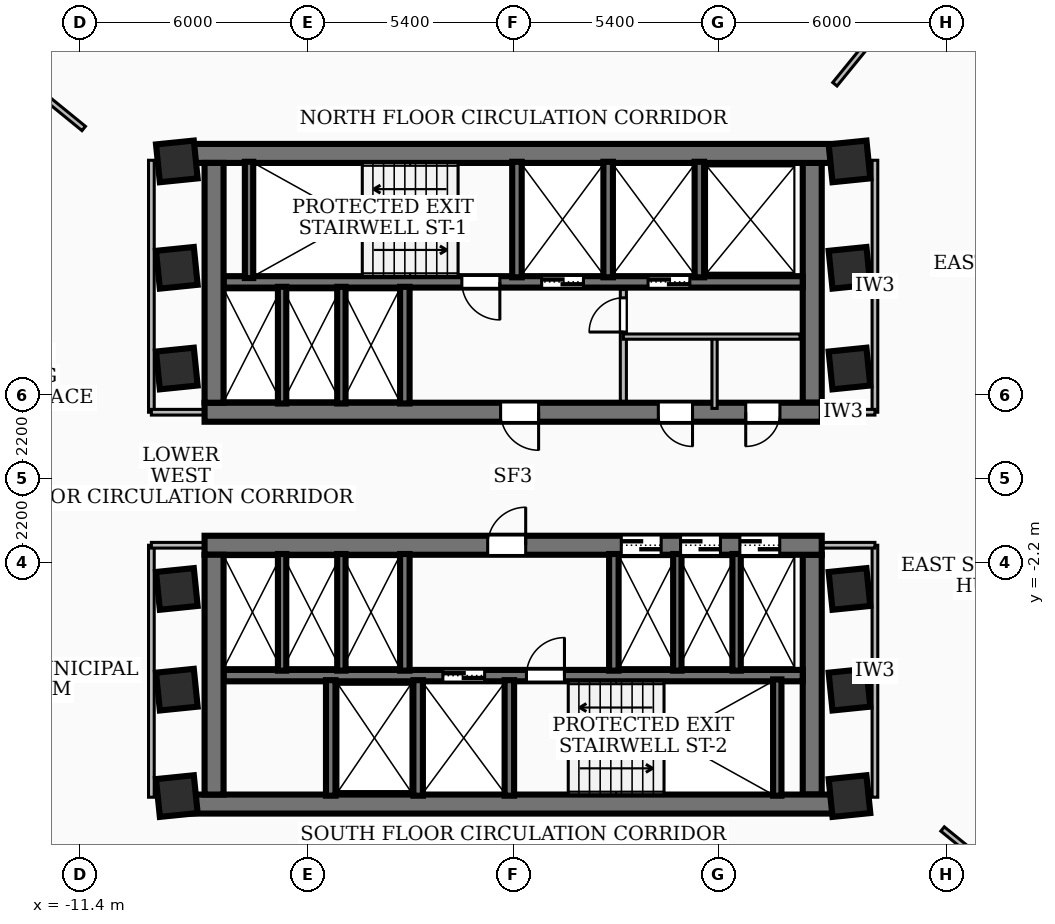
"""IFC4 building model, lengths in metres.
Left out: names, types, materials, properties, quantities, classifications, styles, units other than length and angle.
Written with IfcOpenShell. Run it as: python <this file> out.ifc"""

import sys

from ifc_helpers import new_model, si_unit, direction, frame, frame_2d, origin, origin_2d, place, context, subcontext, project, spatial, rectangle, extrude, element, fill, save


model = new_model("IFC4")
c1 = context("Model", 3, precision=1e-05, world=origin(), true_north=direction((0.0, 1.0)))
c2 = subcontext(c1, "Body", "Model", "MODEL_VIEW")
j1 = project(units=[si_unit("LENGTHUNIT", "METRE"), si_unit("PLANEANGLEUNIT", "RADIAN")], contexts=[c1])
p1 = place(None, origin())
s1 = spatial("IfcSite", under=j1, at=p1, CompositionType="ELEMENT")
p2 = place(p1, origin())
s2 = spatial("IfcBuilding", under=s1, at=p2, CompositionType="ELEMENT")
p3 = place(p2, frame((0.0, 0.0, 71.28)))
s3 = spatial("IfcBuildingStorey", under=s2, at=p3, CompositionType="ELEMENT", Elevation=71.28)
p4 = place(p3, frame((-8.78, 8.56, 0.0), z_axis=(0.0, 0.0, 1.0), x_axis=(1.0, 0.0, 0.0)))
e1 = element("IfcWall", 1, at=p4, inside=s3, PredefinedType="SHEAR", context=c2, shape_type="SweptSolid", body=[
    extrude(rectangle(XDim=17.56, YDim=0.5, at=frame_2d((8.78, 0.0))), origin(), (0.0, 0.0, 1.0), 3.34),
])
p5 = place(p3, frame((8.12, 1.75, 0.0), z_axis=(0.0, 0.0, 1.0), x_axis=(-1.0, 0.0, 0.0)))
e2 = element("IfcWall", 2, at=p5, inside=s3, PredefinedType="SHEAR", context=c2, shape_type="SweptSolid", body=[
    extrude(rectangle(XDim=16.24, YDim=0.5, at=frame_2d((8.12, 0.0))), origin(), (0.0, 0.0, 1.0), 3.34),
])
p6 = place(p5, frame((7.45, 0.0, 0.0)))
e3 = element("IfcOpeningElement", 3, at=p6, cuts=e2, PredefinedType="OPENING", context=c2, shape_type="SweptSolid", body=[
    extrude(rectangle(XDim=1.0, YDim=2.1, at=frame_2d((0.5, 1.05))), frame((0.0, 0.26, 0.0), z_axis=(0.0, -1.0, 0.0), x_axis=(1.0, 0.0, 0.0)), (0.0, 0.0, 1.0), 0.52),
])
p7 = place(p5, frame((3.4, 0.0, 0.0)))
e4 = element("IfcOpeningElement", 4, at=p7, cuts=e2, PredefinedType="OPENING", context=c2, shape_type="SweptSolid", body=[
    extrude(rectangle(XDim=0.9, YDim=2.06, at=frame_2d((0.45, 1.03))), frame((0.0, 0.26, 0.0), z_axis=(0.0, -1.0, 0.0), x_axis=(1.0, 0.0, 0.0)), (0.0, 0.0, 1.0), 0.52),
])
p8 = place(p5, frame((1.1, 0.0, 0.0)))
e5 = element("IfcOpeningElement", 5, at=p8, cuts=e2, PredefinedType="OPENING", context=c2, shape_type="SweptSolid", body=[
    extrude(rectangle(XDim=0.9, YDim=2.06, at=frame_2d((0.45, 1.03))), frame((0.0, 0.26, 0.0), z_axis=(0.0, -1.0, 0.0), x_axis=(1.0, 0.0, 0.0)), (0.0, 0.0, 1.0), 0.52),
])
for number, where, z_axis, x_axis in (
    (6, (-7.87, 2.0, 0.0), (0.0, 0.0, 1.0), (0.0, 1.0, 0.0)),
    (7, (7.87, 8.31, 0.0), (0.0, 0.0, 1.0), (0.0, -1.0, 0.0)),
):
    element("IfcWall", number, at=place(p3, frame(where, z_axis=z_axis, x_axis=x_axis)), inside=s3, PredefinedType="SHEAR", context=c2, shape_type="SweptSolid", body=[
        extrude(rectangle(XDim=6.31, YDim=0.5, at=frame_2d((3.155, 0.0))), origin(), (0.0, 0.0, 1.0), 3.34),
    ])
p9 = place(p3, frame((7.62, 5.18, 0.0), z_axis=(0.0, 0.0, 1.0), x_axis=(-1.0, 0.0, 0.0)))
e8 = element("IfcWall", 8, at=p9, inside=s3, PredefinedType="SOLIDWALL", context=c2, shape_type="SweptSolid", body=[
    extrude(rectangle(XDim=15.24, YDim=0.3, at=frame_2d((7.62, 0.0))), origin(), (0.0, 0.0, 1.0), 3.34),
])
p10 = place(p9, frame((5.77, 0.0, 0.0)))
e9 = element("IfcOpeningElement", 9, at=p10, cuts=e8, PredefinedType="OPENING", context=c2, shape_type="SweptSolid", body=[
    extrude(rectangle(XDim=1.1, YDim=2.15, at=frame_2d((0.55, 1.075))), frame((0.0, 0.16, 0.0), z_axis=(0.0, -1.0, 0.0), x_axis=(1.0, 0.0, 0.0)), (0.0, 0.0, 1.0), 0.32),
])
p11 = place(p9, frame((2.97, 0.0, 0.0)))
e10 = element("IfcOpeningElement", 10, at=p11, cuts=e8, PredefinedType="OPENING", context=c2, shape_type="SweptSolid", body=[
    extrude(rectangle(XDim=1.1, YDim=2.15, at=frame_2d((0.55, 1.075))), frame((0.0, 0.16, 0.0), z_axis=(0.0, -1.0, 0.0), x_axis=(1.0, 0.0, 0.0)), (0.0, 0.0, 1.0), 0.32),
])
p12 = place(p9, frame((7.97, 0.0, 0.0)))
e11 = element("IfcOpeningElement", 11, at=p12, cuts=e8, PredefinedType="OPENING", context=c2, shape_type="SweptSolid", body=[
    extrude(rectangle(XDim=1.0, YDim=2.1, at=frame_2d((0.5, 1.05))), frame((0.0, 0.16, 0.0), z_axis=(0.0, -1.0, 0.0), x_axis=(1.0, 0.0, 0.0)), (0.0, 0.0, 1.0), 0.32),
])
p13 = place(p3, frame((8.78, -8.56, 0.0), z_axis=(0.0, 0.0, 1.0), x_axis=(-1.0, 0.0, 0.0)))
e12 = element("IfcWall", 12, at=p13, inside=s3, PredefinedType="SHEAR", context=c2, shape_type="SweptSolid", body=[
    extrude(rectangle(XDim=17.56, YDim=0.5, at=frame_2d((8.78, 0.0))), origin(), (0.0, 0.0, 1.0), 3.34),
])
p14 = place(p3, frame((-8.12, -1.75, 0.0), z_axis=(0.0, 0.0, 1.0), x_axis=(1.0, 0.0, 0.0)))
e13 = element("IfcWall", 13, at=p14, inside=s3, PredefinedType="SHEAR", context=c2, shape_type="SweptSolid", body=[
    extrude(rectangle(XDim=16.24, YDim=0.5, at=frame_2d((8.12, 0.0))), origin(), (0.0, 0.0, 1.0), 3.34),
])
p15 = place(p14, frame((7.45, 0.0, 0.0)))
e14 = element("IfcOpeningElement", 14, at=p15, cuts=e13, PredefinedType="OPENING", context=c2, shape_type="SweptSolid", body=[
    extrude(rectangle(XDim=1.0, YDim=2.1, at=frame_2d((0.5, 1.05))), frame((0.0, 0.26, 0.0), z_axis=(0.0, -1.0, 0.0), x_axis=(1.0, 0.0, 0.0)), (0.0, 0.0, 1.0), 0.52),
])
p16 = place(p14, frame((10.965, 0.0, 0.0)))
e15 = element("IfcOpeningElement", 15, at=p16, cuts=e13, PredefinedType="OPENING", context=c2, shape_type="SweptSolid", body=[
    extrude(rectangle(XDim=1.05, YDim=2.15, at=frame_2d((0.525, 1.075))), frame((0.0, 0.26, 0.0), z_axis=(0.0, -1.0, 0.0), x_axis=(1.0, 0.0, 0.0)), (0.0, 0.0, 1.0), 0.52),
])
p17 = place(p14, frame((12.525, 0.0, 0.0)))
e16 = element("IfcOpeningElement", 16, at=p17, cuts=e13, PredefinedType="OPENING", context=c2, shape_type="SweptSolid", body=[
    extrude(rectangle(XDim=1.05, YDim=2.15, at=frame_2d((0.525, 1.075))), frame((0.0, 0.26, 0.0), z_axis=(0.0, -1.0, 0.0), x_axis=(1.0, 0.0, 0.0)), (0.0, 0.0, 1.0), 0.52),
])
p18 = place(p14, frame((14.085, 0.0, 0.0)))
e17 = element("IfcOpeningElement", 17, at=p18, cuts=e13, PredefinedType="OPENING", context=c2, shape_type="SweptSolid", body=[
    extrude(rectangle(XDim=1.05, YDim=2.15, at=frame_2d((0.525, 1.075))), frame((0.0, 0.26, 0.0), z_axis=(0.0, -1.0, 0.0), x_axis=(1.0, 0.0, 0.0)), (0.0, 0.0, 1.0), 0.52),
])
for number, where, z_axis, x_axis in (
    (18, (-7.87, -8.31, 0.0), (0.0, 0.0, 1.0), (0.0, 1.0, 0.0)),
    (19, (7.87, -2.0, 0.0), (0.0, 0.0, 1.0), (0.0, -1.0, 0.0)),
):
    element("IfcWall", number, at=place(p3, frame(where, z_axis=z_axis, x_axis=x_axis)), inside=s3, PredefinedType="SHEAR", context=c2, shape_type="SweptSolid", body=[
        extrude(rectangle(XDim=6.31, YDim=0.5, at=frame_2d((3.155, 0.0))), origin(), (0.0, 0.0, 1.0), 3.34),
    ])
p19 = place(p3, frame((-7.62, -5.18, 0.0), z_axis=(0.0, 0.0, 1.0), x_axis=(1.0, 0.0, 0.0)))
e20 = element("IfcWall", 20, at=p19, inside=s3, PredefinedType="SOLIDWALL", context=c2, shape_type="SweptSolid", body=[
    extrude(rectangle(XDim=15.24, YDim=0.3, at=frame_2d((7.62, 0.0))), origin(), (0.0, 0.0, 1.0), 3.34),
])
p20 = place(p19, frame((5.77, 0.0, 0.0)))
e21 = element("IfcOpeningElement", 21, at=p20, cuts=e20, PredefinedType="OPENING", context=c2, shape_type="SweptSolid", body=[
    extrude(rectangle(XDim=1.1, YDim=2.15, at=frame_2d((0.55, 1.075))), frame((0.0, 0.16, 0.0), z_axis=(0.0, -1.0, 0.0), x_axis=(1.0, 0.0, 0.0)), (0.0, 0.0, 1.0), 0.32),
])
p21 = place(p19, frame((7.97, 0.0, 0.0)))
e22 = element("IfcOpeningElement", 22, at=p21, cuts=e20, PredefinedType="OPENING", context=c2, shape_type="SweptSolid", body=[
    extrude(rectangle(XDim=1.0, YDim=2.1, at=frame_2d((0.5, 1.05))), frame((0.0, 0.16, 0.0), z_axis=(0.0, -1.0, 0.0), x_axis=(1.0, 0.0, 0.0)), (0.0, 0.0, 1.0), 0.32),
])
for number, where, z_axis, x_axis in (
    (23, (-6.95, 5.28, 0.0), (0.0, 0.0, 1.0), (0.0, 1.0, 0.0)),
    (24, (6.95, -8.34, 0.0), (0.0, 0.0, 1.0), (0.0, 1.0, 0.0)),
):
    element("IfcWall", number, at=place(p3, frame(where, z_axis=z_axis, x_axis=x_axis)), inside=s3, PredefinedType="SOLIDWALL", context=c2, shape_type="SweptSolid", body=[
        extrude(rectangle(XDim=3.06, YDim=0.22, at=frame_2d((1.53, 0.0))), origin(), (0.0, 0.0, 1.0), 3.34),
    ])
for number, where, z_axis, x_axis in (
    (25, (0.1, 5.3, 0.0), (0.0, 0.0, 1.0), (0.0, 1.0, 0.0)),
    (26, (2.5, 5.3, 0.0), (0.0, 0.0, 1.0), (0.0, 1.0, 0.0)),
    (27, (4.9, 5.3, 0.0), (0.0, 0.0, 1.0), (0.0, 1.0, 0.0)),
):
    element("IfcWall", number, at=place(p3, frame(where, z_axis=z_axis, x_axis=x_axis)), inside=s3, PredefinedType="SOLIDWALL", context=c2, shape_type="SweptSolid", body=[
        extrude(rectangle(XDim=3.04, YDim=0.25, at=frame_2d((1.52, 0.0))), origin(), (0.0, 0.0, 1.0), 3.34),
    ])
p22 = place(p3, frame((-2.85, 1.98, 0.0), z_axis=(0.0, 0.0, 1.0), x_axis=(0.0, 1.0, 0.0)))
e28 = element("IfcWall", 28, at=p22, inside=s3, PredefinedType="SOLIDWALL", context=c2, shape_type="SweptSolid", body=[
    extrude(rectangle(XDim=3.07, YDim=0.25, at=frame_2d((1.535, 0.0))), origin(), (0.0, 0.0, 1.0), 3.34),
])
for number, where, z_axis, x_axis in (
    (29, (-0.1, -8.34, 0.0), (0.0, 0.0, 1.0), (0.0, 1.0, 0.0)),
    (30, (-2.5, -8.34, 0.0), (0.0, 0.0, 1.0), (0.0, 1.0, 0.0)),
    (31, (-4.8, -8.34, 0.0), (0.0, 0.0, 1.0), (0.0, 1.0, 0.0)),
):
    element("IfcWall", number, at=place(p3, frame(where, z_axis=z_axis, x_axis=x_axis)), inside=s3, PredefinedType="SOLIDWALL", context=c2, shape_type="SweptSolid", body=[
        extrude(rectangle(XDim=3.04, YDim=0.25, at=frame_2d((1.52, 0.0))), origin(), (0.0, 0.0, 1.0), 3.34),
    ])
for number, where, z_axis, x_axis in (
    (32, (-2.85, -5.05, 0.0), (0.0, 0.0, 1.0), (0.0, 1.0, 0.0)),
    (33, (2.65, -5.05, 0.0), (0.0, 0.0, 1.0), (0.0, 1.0, 0.0)),
):
    element("IfcWall", number, at=place(p3, frame(where, z_axis=z_axis, x_axis=x_axis)), inside=s3, PredefinedType="SOLIDWALL", context=c2, shape_type="SweptSolid", body=[
        extrude(rectangle(XDim=3.07, YDim=0.25, at=frame_2d((1.535, 0.0))), origin(), (0.0, 0.0, 1.0), 3.34),
    ])
for number, where, z_axis, x_axis in (
    (34, (-6.08, 1.98, 0.0), (0.0, 0.0, 1.0), (0.0, 1.0, 0.0)),
    (35, (-4.52, 1.98, 0.0), (0.0, 0.0, 1.0), (0.0, 1.0, 0.0)),
    (36, (4.32, -5.05, 0.0), (0.0, 0.0, 1.0), (0.0, 1.0, 0.0)),
    (37, (5.88, -5.05, 0.0), (0.0, 0.0, 1.0), (0.0, 1.0, 0.0)),
    (38, (-6.08, -5.05, 0.0), (0.0, 0.0, 1.0), (0.0, 1.0, 0.0)),
    (39, (-4.52, -5.05, 0.0), (0.0, 0.0, 1.0), (0.0, 1.0, 0.0)),
):
    element("IfcWall", number, at=place(p3, frame(where, z_axis=z_axis, x_axis=x_axis)), inside=s3, PredefinedType="SOLIDWALL", context=c2, shape_type="SweptSolid", body=[
        extrude(rectangle(XDim=3.07, YDim=0.22, at=frame_2d((1.535, 0.0))), origin(), (0.0, 0.0, 1.0), 3.34),
    ])
for number, where, z_axis, x_axis in (
    (40, (-8.85, -5.55, 0.0), (0.0, 0.0, 1.0), (0.995, 0.101, 0.0)),
    (41, (-8.85, -2.9, 0.0), (0.0, 0.0, 1.0), (0.995, 0.101, 0.0)),
    (42, (-8.85, 2.9, 0.0), (0.0, 0.0, 1.0), (0.995, 0.101, 0.0)),
    (43, (-8.85, 5.55, 0.0), (0.0, 0.0, 1.0), (0.995, 0.101, 0.0)),
    (44, (8.85, -5.55, 0.0), (0.0, 0.0, 1.0), (0.995, 0.101, 0.0)),
    (45, (8.85, -2.9, 0.0), (0.0, 0.0, 1.0), (0.995, 0.101, 0.0)),
    (46, (8.85, 2.9, 0.0), (0.0, 0.0, 1.0), (0.995, 0.101, 0.0)),
    (47, (8.85, 5.55, 0.0), (0.0, 0.0, 1.0), (0.995, 0.101, 0.0)),
    (48, (-8.85, 8.35, 0.0), (0.0, 0.0, 1.0), (0.995, 0.101, 0.0)),
    (49, (8.85, -8.35, 0.0), (0.0, 0.0, 1.0), (0.995, 0.101, 0.0)),
    (50, (8.85, 8.35, 0.0), (0.0, 0.0, 1.0), (0.995, 0.101, 0.0)),
    (51, (-8.85, -8.35, 0.0), (0.0, 0.0, 1.0), (0.995, 0.101, 0.0)),
):
    element("IfcColumn", number, at=place(p3, frame(where, z_axis=z_axis, x_axis=x_axis)), inside=s3, PredefinedType="COLUMN", context=c2, shape_type="SweptSolid", body=[
        extrude(rectangle(XDim=1.0, YDim=1.0, at=origin_2d()), origin(), (0.0, 0.0, 1.0), 3.6),
    ])
p23 = place(p3, frame((2.9, 2.04, 0.0), z_axis=(0.0, 0.0, 1.0), x_axis=(0.0, 1.0, 0.0)))
e52 = element("IfcWall", 52, at=p23, inside=s3, PredefinedType="PARTITIONING", context=c2, shape_type="SweptSolid", body=[
    extrude(rectangle(XDim=2.94, YDim=0.16, at=frame_2d((1.47, 0.0))), origin(), (0.0, 0.0, 1.0), 2.405),
])
p24 = place(p23, frame((1.82, 0.0, 0.0)))
e53 = element("IfcOpeningElement", 53, at=p24, cuts=e52, PredefinedType="OPENING", context=c2, shape_type="SweptSolid", body=[
    extrude(rectangle(XDim=0.9, YDim=2.06, at=frame_2d((0.45, 1.03))), frame((0.0, 0.09, 0.0), z_axis=(0.0, -1.0, 0.0), x_axis=(1.0, 0.0, 0.0)), (0.0, 0.0, 1.0), 0.18),
])
p25 = place(p3, frame((2.9, 3.74, 0.0), z_axis=(0.0, 0.0, 1.0), x_axis=(1.0, 0.0, 0.0)))
e54 = element("IfcWall", 54, at=p25, inside=s3, PredefinedType="PARTITIONING", context=c2, shape_type="SweptSolid", body=[
    extrude(rectangle(XDim=4.65, YDim=0.138, at=frame_2d((2.325, 0.0))), origin(), (0.0, 0.0, 1.0), 3.34),
])
p26 = place(p3, frame((5.3, 1.85, 0.0), z_axis=(0.0, 0.0, 1.0), x_axis=(0.0, 1.0, 0.0)))
e55 = element("IfcWall", 55, at=p26, inside=s3, PredefinedType="PARTITIONING", context=c2, shape_type="SweptSolid", body=[
    extrude(rectangle(XDim=1.89, YDim=0.138, at=frame_2d((0.945, 0.0))), origin(), (0.0, 0.0, 1.0), 2.405),
])
p27 = place(p3, frame((-9.52, 1.75, 0.0), z_axis=(0.0, 0.0, 1.0), x_axis=(0.0, 1.0, 0.0)))
e56 = element("IfcWall", 56, at=p27, inside=s3, PredefinedType="PARTITIONING", context=c2, shape_type="SweptSolid", body=[
    extrude(rectangle(XDim=6.63, YDim=0.15, at=frame_2d((3.315, 0.0))), origin(), (0.0, 0.0, 1.0), 2.486),
])
p28 = place(p3, frame((-7.85, 1.75, 0.0), z_axis=(0.0, 0.0, 1.0), x_axis=(-1.0, 0.0, 0.0)))
e57 = element("IfcWall", 57, at=p28, inside=s3, PredefinedType="PARTITIONING", context=c2, shape_type="SweptSolid", body=[
    extrude(rectangle(XDim=1.67, YDim=0.15, at=frame_2d((0.835, 0.0))), origin(), (0.0, 0.0, 1.0), 2.405),
])
p29 = place(p3, frame((-9.52, -8.38, 0.0), z_axis=(0.0, 0.0, 1.0), x_axis=(0.0, 1.0, 0.0)))
e58 = element("IfcWall", 58, at=p29, inside=s3, PredefinedType="PARTITIONING", context=c2, shape_type="SweptSolid", body=[
    extrude(rectangle(XDim=6.63, YDim=0.15, at=frame_2d((3.315, 0.0))), origin(), (0.0, 0.0, 1.0), 2.486),
])
p30 = place(p3, frame((-7.85, -1.75, 0.0), z_axis=(0.0, 0.0, 1.0), x_axis=(-1.0, 0.0, 0.0)))
e59 = element("IfcWall", 59, at=p30, inside=s3, PredefinedType="PARTITIONING", context=c2, shape_type="SweptSolid", body=[
    extrude(rectangle(XDim=1.67, YDim=0.15, at=frame_2d((0.835, 0.0))), origin(), (0.0, 0.0, 1.0), 2.405),
])
p31 = place(p3, frame((9.52, 1.75, 0.0), z_axis=(0.0, 0.0, 1.0), x_axis=(0.0, 1.0, 0.0)))
e60 = element("IfcWall", 60, at=p31, inside=s3, PredefinedType="PARTITIONING", context=c2, shape_type="SweptSolid", body=[
    extrude(rectangle(XDim=6.63, YDim=0.15, at=frame_2d((3.315, 0.0))), origin(), (0.0, 0.0, 1.0), 2.486),
])
p32 = place(p3, frame((7.85, 1.75, 0.0), z_axis=(0.0, 0.0, 1.0), x_axis=(1.0, 0.0, 0.0)))
e61 = element("IfcWall", 61, at=p32, inside=s3, PredefinedType="PARTITIONING", context=c2, shape_type="SweptSolid", body=[
    extrude(rectangle(XDim=1.67, YDim=0.15, at=frame_2d((0.835, 0.0))), origin(), (0.0, 0.0, 1.0), 2.405),
])
p33 = place(p3, frame((9.52, -8.38, 0.0), z_axis=(0.0, 0.0, 1.0), x_axis=(0.0, 1.0, 0.0)))
e62 = element("IfcWall", 62, at=p33, inside=s3, PredefinedType="PARTITIONING", context=c2, shape_type="SweptSolid", body=[
    extrude(rectangle(XDim=6.63, YDim=0.15, at=frame_2d((3.315, 0.0))), origin(), (0.0, 0.0, 1.0), 2.486),
])
p34 = place(p3, frame((7.85, -1.75, 0.0), z_axis=(0.0, 0.0, 1.0), x_axis=(1.0, 0.0, 0.0)))
e63 = element("IfcWall", 63, at=p34, inside=s3, PredefinedType="PARTITIONING", context=c2, shape_type="SweptSolid", body=[
    extrude(rectangle(XDim=1.67, YDim=0.15, at=frame_2d((0.835, 0.0))), origin(), (0.0, 0.0, 1.0), 2.405),
])
p35 = place(p3, frame((8.466, 10.38, 0.0), z_axis=(0.0, 0.0, 1.0), x_axis=(0.631992375104, 0.774974604623, 0.0)))
e64 = element("IfcWall", 64, at=p35, inside=s3, PredefinedType="PARTITIONING", context=c2, shape_type="SweptSolid", body=[
    extrude(rectangle(XDim=6.26, YDim=0.145, at=frame_2d((3.13, 0.0))), origin(), (0.0, 0.0, 1.0), 3.34),
])
for number, where, z_axis, x_axis in (
    (65, (-11.3, 9.216, 0.0), (0.0, 0.0, 1.0), (-0.775, 0.632, 0.0)),
    (66, (11.3, -9.216, 0.0), (0.0, 0.0, 1.0), (0.775, -0.632, 0.0)),
):
    element("IfcWall", number, at=place(p3, frame(where, z_axis=z_axis, x_axis=x_axis)), inside=s3, PredefinedType="PARTITIONING", context=c2, shape_type="SweptSolid", body=[
        extrude(rectangle(XDim=5.073, YDim=0.145, at=frame_2d((2.536, 0.0))), origin(), (0.0, 0.0, 1.0), 3.34),
    ])
p36 = place(p6, origin())
e67 = element("IfcDoor", 67, at=p36, inside=s3, OperationType="SINGLE_SWING_LEFT", PredefinedType="DOOR", context=c2, shape_type="SweptSolid", body=[
    extrude(rectangle(XDim=1.0, YDim=2.1, at=frame_2d((0.5, 1.05))), frame((0.0, 0.025, 0.0), z_axis=(0.0, -1.0, 0.0), x_axis=(1.0, 0.0, 0.0)), (0.0, 0.0, 1.0), 0.05),
])
fill(e3, e67)
p37 = place(p15, origin())
e68 = element("IfcDoor", 68, at=p37, inside=s3, OperationType="SINGLE_SWING_RIGHT", PredefinedType="DOOR", context=c2, shape_type="SweptSolid", body=[
    extrude(rectangle(XDim=1.0, YDim=2.1, at=frame_2d((0.5, 1.05))), frame((0.0, 0.025, 0.0), z_axis=(0.0, -1.0, 0.0), x_axis=(1.0, 0.0, 0.0)), (0.0, 0.0, 1.0), 0.05),
])
fill(e14, e68)
p38 = place(p10, origin())
e69 = element("IfcDoor", 69, at=p38, inside=s3, OperationType="DOUBLE_DOOR_SLIDING", PredefinedType="DOOR", context=c2, shape_type="SweptSolid", body=[
    extrude(rectangle(XDim=1.1, YDim=2.15, at=frame_2d((0.55, 1.075))), frame((0.0, 0.025, 0.0), z_axis=(0.0, -1.0, 0.0), x_axis=(1.0, 0.0, 0.0)), (0.0, 0.0, 1.0), 0.05),
])
fill(e9, e69)
p39 = place(p11, origin())
e70 = element("IfcDoor", 70, at=p39, inside=s3, OperationType="DOUBLE_DOOR_SLIDING", PredefinedType="DOOR", context=c2, shape_type="SweptSolid", body=[
    extrude(rectangle(XDim=1.1, YDim=2.15, at=frame_2d((0.55, 1.075))), frame((0.0, 0.025, 0.0), z_axis=(0.0, -1.0, 0.0), x_axis=(1.0, 0.0, 0.0)), (0.0, 0.0, 1.0), 0.05),
])
fill(e10, e70)
p40 = place(p12, origin())
e71 = element("IfcDoor", 71, at=p40, inside=s3, OperationType="SINGLE_SWING_LEFT", PredefinedType="DOOR", context=c2, shape_type="SweptSolid", body=[
    extrude(rectangle(XDim=1.0, YDim=2.1, at=frame_2d((0.5, 1.05))), frame((0.0, 0.025, 0.0), z_axis=(0.0, -1.0, 0.0), x_axis=(1.0, 0.0, 0.0)), (0.0, 0.0, 1.0), 0.05),
])
fill(e11, e71)
p41 = place(p20, origin())
e72 = element("IfcDoor", 72, at=p41, inside=s3, OperationType="DOUBLE_DOOR_SLIDING", PredefinedType="DOOR", context=c2, shape_type="SweptSolid", body=[
    extrude(rectangle(XDim=1.1, YDim=2.15, at=frame_2d((0.55, 1.075))), frame((0.0, 0.025, 0.0), z_axis=(0.0, -1.0, 0.0), x_axis=(1.0, 0.0, 0.0)), (0.0, 0.0, 1.0), 0.05),
])
fill(e21, e72)
p42 = place(p21, origin())
e73 = element("IfcDoor", 73, at=p42, inside=s3, OperationType="SINGLE_SWING_RIGHT", PredefinedType="DOOR", context=c2, shape_type="SweptSolid", body=[
    extrude(rectangle(XDim=1.0, YDim=2.1, at=frame_2d((0.5, 1.05))), frame((0.0, 0.025, 0.0), z_axis=(0.0, -1.0, 0.0), x_axis=(1.0, 0.0, 0.0)), (0.0, 0.0, 1.0), 0.05),
])
fill(e22, e73)
p43 = place(p16, origin())
e74 = element("IfcDoor", 74, at=p43, inside=s3, OperationType="DOUBLE_DOOR_SLIDING", PredefinedType="DOOR", context=c2, shape_type="SweptSolid", body=[
    extrude(rectangle(XDim=1.05, YDim=2.15, at=frame_2d((0.525, 1.075))), frame((0.0, 0.025, 0.0), z_axis=(0.0, -1.0, 0.0), x_axis=(1.0, 0.0, 0.0)), (0.0, 0.0, 1.0), 0.05),
])
fill(e15, e74)
p44 = place(p17, origin())
e75 = element("IfcDoor", 75, at=p44, inside=s3, OperationType="DOUBLE_DOOR_SLIDING", PredefinedType="DOOR", context=c2, shape_type="SweptSolid", body=[
    extrude(rectangle(XDim=1.05, YDim=2.15, at=frame_2d((0.525, 1.075))), frame((0.0, 0.025, 0.0), z_axis=(0.0, -1.0, 0.0), x_axis=(1.0, 0.0, 0.0)), (0.0, 0.0, 1.0), 0.05),
])
fill(e16, e75)
p45 = place(p18, origin())
e76 = element("IfcDoor", 76, at=p45, inside=s3, OperationType="DOUBLE_DOOR_SLIDING", PredefinedType="DOOR", context=c2, shape_type="SweptSolid", body=[
    extrude(rectangle(XDim=1.05, YDim=2.15, at=frame_2d((0.525, 1.075))), frame((0.0, 0.025, 0.0), z_axis=(0.0, -1.0, 0.0), x_axis=(1.0, 0.0, 0.0)), (0.0, 0.0, 1.0), 0.05),
])
fill(e17, e76)
p46 = place(p7, origin())
e77 = element("IfcDoor", 77, at=p46, inside=s3, OperationType="SINGLE_SWING_LEFT", PredefinedType="DOOR", context=c2, shape_type="SweptSolid", body=[
    extrude(rectangle(XDim=0.9, YDim=2.06, at=frame_2d((0.45, 1.03))), frame((0.0, 0.025, 0.0), z_axis=(0.0, -1.0, 0.0), x_axis=(1.0, 0.0, 0.0)), (0.0, 0.0, 1.0), 0.05),
])
fill(e4, e77)
p47 = place(p8, origin())
e78 = element("IfcDoor", 78, at=p47, inside=s3, OperationType="SINGLE_SWING_RIGHT", PredefinedType="DOOR", context=c2, shape_type="SweptSolid", body=[
    extrude(rectangle(XDim=0.9, YDim=2.06, at=frame_2d((0.45, 1.03))), frame((0.0, 0.025, 0.0), z_axis=(0.0, -1.0, 0.0), x_axis=(1.0, 0.0, 0.0)), (0.0, 0.0, 1.0), 0.05),
])
fill(e5, e78)
p48 = place(p24, origin())
e79 = element("IfcDoor", 79, at=p48, inside=s3, OperationType="SINGLE_SWING_LEFT", PredefinedType="DOOR", context=c2, shape_type="SweptSolid", body=[
    extrude(rectangle(XDim=0.9, YDim=2.06, at=frame_2d((0.45, 1.03))), frame((0.0, 0.025, 0.0), z_axis=(0.0, -1.0, 0.0), x_axis=(1.0, 0.0, 0.0)), (0.0, 0.0, 1.0), 0.05),
])
fill(e53, e79)
save(model, sys.argv[1])
